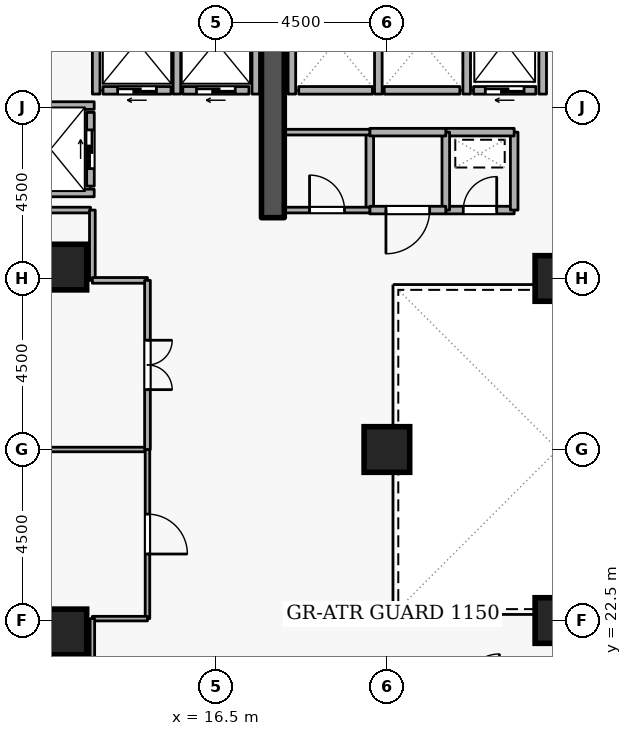
"""IFC4 building model, lengths in metres.
Left out: names, types, materials, properties, quantities, classifications, styles, units other than length and angle.
Written with IfcOpenShell. Run it as: python <this file> out.ifc"""

import sys

from ifc_helpers import new_model, si_unit, direction, frame, frame_2d, origin, origin_2d, place, context, subcontext, project, spatial, rectangle, extrude, element, fill, save


model = new_model("IFC4")
c1 = context("Model", 3, precision=1e-05, world=origin(), true_north=direction((0.0, 1.0)))
c2 = subcontext(c1, "Body", "Model", "MODEL_VIEW")
j1 = project(units=[si_unit("LENGTHUNIT", "METRE"), si_unit("PLANEANGLEUNIT", "RADIAN")], contexts=[c1])
p1 = place(None, origin())
s1 = spatial("IfcSite", under=j1, at=p1, CompositionType="ELEMENT")
p2 = place(p1, origin())
s2 = spatial("IfcBuilding", under=s1, at=p2, CompositionType="ELEMENT")
p3 = place(p2, frame((0.0, 0.0, 98.1)))
s3 = spatial("IfcBuildingStorey", under=s2, at=p3, CompositionType="ELEMENT", Elevation=98.1)
p4 = place(p3, frame((18.0, 33.1, 0.0), z_axis=(0.0, 0.0, 1.0), x_axis=(0.0, 1.0, 0.0)))
e1 = element("IfcWall", 1, at=p4, inside=s3, PredefinedType="SHEAR", context=c2, shape_type="SweptSolid", body=[
    extrude(rectangle(XDim=5.7, YDim=0.6, at=frame_2d((2.85, 0.0))), origin(), (0.0, 0.0, 1.0), 3.6),
])
for number, where, z_axis, x_axis in (
    (2, (12.5, 22.2, 0.0), (0.0, 0.0, 1.0), (1.0, 0.0, 0.0)),
    (3, (12.5, 31.8, 0.0), (0.0, 0.0, 1.0), (1.0, 0.0, 0.0)),
    (4, (25.5, 22.5, 0.0), (0.0, 0.0, 1.0), (1.0, 0.0, 0.0)),
    (5, (25.5, 31.5, 0.0), (0.0, 0.0, 1.0), (1.0, 0.0, 0.0)),
    (6, (21.0, 27.0, 0.0), (0.0, 0.0, 1.0), (1.0, 0.0, 0.0)),
):
    element("IfcColumn", number, at=place(p3, frame(where, z_axis=z_axis, x_axis=x_axis)), inside=s3, PredefinedType="COLUMN", context=c2, shape_type="SweptSolid", body=[
        extrude(rectangle(XDim=1.2, YDim=1.2, at=origin_2d()), origin(), (0.0, 0.0, 1.0), 3.6),
    ])
p5 = place(p3, frame((24.92, 36.45, 0.0), z_axis=(0.0, 0.0, 1.0), x_axis=(-1.0, 0.0, 0.0)))
e7 = element("IfcWall", 7, at=p5, inside=s3, PredefinedType="STANDARD", context=c2, shape_type="SweptSolid", body=[
    extrude(rectangle(XDim=1.64, YDim=0.2, at=frame_2d((0.82, 0.0))), origin(), (0.0, 0.0, 1.0), 3.3),
])
p6 = place(p5, frame((0.31, 0.0, 0.0)))
e8 = element("IfcOpeningElement", 8, at=p6, cuts=e7, PredefinedType="OPENING", context=c2, shape_type="SweptSolid", body=[
    extrude(rectangle(XDim=1.02, YDim=2.06, at=frame_2d((0.51, 1.03))), frame((0.0, 0.11, 0.0), z_axis=(0.0, -1.0, 0.0), x_axis=(1.0, 0.0, 0.0)), (0.0, 0.0, 1.0), 0.22),
])
p7 = place(p3, frame((22.92, 36.45, 0.0), z_axis=(0.0, 0.0, 1.0), x_axis=(-1.0, 0.0, 0.0)))
e9 = element("IfcWall", 9, at=p7, inside=s3, PredefinedType="STANDARD", context=c2, shape_type="SweptSolid", body=[
    extrude(rectangle(XDim=1.99, YDim=0.2, at=frame_2d((0.995, 0.0))), origin(), (0.0, 0.0, 1.0), 3.3),
])
p8 = place(p3, frame((20.62, 36.45, 0.0), z_axis=(0.0, 0.0, 1.0), x_axis=(-1.0, 0.0, 0.0)))
e10 = element("IfcWall", 10, at=p8, inside=s3, PredefinedType="STANDARD", context=c2, shape_type="SweptSolid", body=[
    extrude(rectangle(XDim=1.94, YDim=0.2, at=frame_2d((0.97, 0.0))), origin(), (0.0, 0.0, 1.0), 3.3),
])
p9 = place(p3, frame((17.37, 36.45, 0.0), z_axis=(0.0, 0.0, 1.0), x_axis=(-1.0, 0.0, 0.0)))
e11 = element("IfcWall", 11, at=p9, inside=s3, PredefinedType="STANDARD", context=c2, shape_type="SweptSolid", body=[
    extrude(rectangle(XDim=1.74, YDim=0.2, at=frame_2d((0.87, 0.0))), origin(), (0.0, 0.0, 1.0), 3.3),
])
p10 = place(p9, frame((0.36, 0.0, 0.0)))
e12 = element("IfcOpeningElement", 12, at=p10, cuts=e11, PredefinedType="OPENING", context=c2, shape_type="SweptSolid", body=[
    extrude(rectangle(XDim=1.02, YDim=2.06, at=frame_2d((0.51, 1.03))), frame((0.0, 0.11, 0.0), z_axis=(0.0, -1.0, 0.0), x_axis=(1.0, 0.0, 0.0)), (0.0, 0.0, 1.0), 0.22),
])
p11 = place(p3, frame((15.32, 36.45, 0.0), z_axis=(0.0, 0.0, 1.0), x_axis=(-1.0, 0.0, 0.0)))
e13 = element("IfcWall", 13, at=p11, inside=s3, PredefinedType="STANDARD", context=c2, shape_type="SweptSolid", body=[
    extrude(rectangle(XDim=1.79, YDim=0.2, at=frame_2d((0.895, 0.0))), origin(), (0.0, 0.0, 1.0), 3.3),
])
p12 = place(p11, frame((0.385, 0.0, 0.0)))
e14 = element("IfcOpeningElement", 14, at=p12, cuts=e13, PredefinedType="OPENING", context=c2, shape_type="SweptSolid", body=[
    extrude(rectangle(XDim=1.02, YDim=2.06, at=frame_2d((0.51, 1.03))), frame((0.0, 0.11, 0.0), z_axis=(0.0, -1.0, 0.0), x_axis=(1.0, 0.0, 0.0)), (0.0, 0.0, 1.0), 0.22),
])
p13 = place(p3, frame((13.2, 33.93, 0.0), z_axis=(0.0, 0.0, 1.0), x_axis=(0.0, 1.0, 0.0)))
e15 = element("IfcWall", 15, at=p13, inside=s3, PredefinedType="STANDARD", context=c2, shape_type="SweptSolid", body=[
    extrude(rectangle(XDim=1.94, YDim=0.2, at=frame_2d((0.97, 0.0))), origin(), (0.0, 0.0, 1.0), 3.3),
])
p14 = place(p13, frame((0.46, 0.0, 0.0)))
e16 = element("IfcOpeningElement", 16, at=p14, cuts=e15, PredefinedType="OPENING", context=c2, shape_type="SweptSolid", body=[
    extrude(rectangle(XDim=1.02, YDim=2.06, at=frame_2d((0.51, 1.03))), frame((0.0, 0.11, 0.0), z_axis=(0.0, -1.0, 0.0), x_axis=(1.0, 0.0, 0.0)), (0.0, 0.0, 1.0), 0.22),
])
for number, where, z_axis, x_axis in (
    (17, (25.1, 36.352, 0.0), (0.0, 0.0, 1.0), (0.0, 1.0, 0.0)),
    (18, (23.1, 36.352, 0.0), (0.0, 0.0, 1.0), (0.0, 1.0, 0.0)),
    (19, (20.775, 36.352, 0.0), (0.0, 0.0, 1.0), (0.0, 1.0, 0.0)),
    (20, (18.5, 36.352, 0.0), (0.0, 0.0, 1.0), (0.0, 1.0, 0.0)),
):
    element("IfcWall", number, at=place(p3, frame(where, z_axis=z_axis, x_axis=x_axis)), inside=s3, PredefinedType="STANDARD", context=c2, shape_type="SweptSolid", body=[
        extrude(rectangle(XDim=2.436, YDim=0.2, at=frame_2d((1.218, 0.0))), origin(), (0.0, 0.0, 1.0), 3.3),
    ])
p15 = place(p3, frame((17.55, 36.352, 0.0), z_axis=(0.0, 0.0, 1.0), x_axis=(0.0, 1.0, 0.0)))
e21 = element("IfcWall", 21, at=p15, inside=s3, PredefinedType="STANDARD", context=c2, shape_type="SweptSolid", body=[
    extrude(rectangle(XDim=2.636, YDim=0.2, at=frame_2d((1.318, 0.0))), origin(), (0.0, 0.0, 1.0), 2.505),
])
for number, where, z_axis, x_axis in (
    (22, (15.475, 36.352, 0.0), (0.0, 0.0, 1.0), (0.0, 1.0, 0.0)),
    (23, (13.35, 36.352, 0.0), (0.0, 0.0, 1.0), (0.0, 1.0, 0.0)),
):
    element("IfcWall", number, at=place(p3, frame(where, z_axis=z_axis, x_axis=x_axis)), inside=s3, PredefinedType="STANDARD", context=c2, shape_type="SweptSolid", body=[
        extrude(rectangle(XDim=2.636, YDim=0.2, at=frame_2d((1.318, 0.0))), origin(), (0.0, 0.0, 1.0), 3.3),
    ])
for number, where, z_axis, x_axis in (
    (24, (11.002, 36.05, 0.0), (0.0, 0.0, 1.0), (1.0, 0.0, 0.0)),
    (25, (11.002, 33.75, 0.0), (0.0, 0.0, 1.0), (1.0, 0.0, 0.0)),
):
    element("IfcWall", number, at=place(p3, frame(where, z_axis=z_axis, x_axis=x_axis)), inside=s3, PredefinedType="STANDARD", context=c2, shape_type="SweptSolid", body=[
        extrude(rectangle(XDim=2.296, YDim=0.2, at=frame_2d((1.148, 0.0))), origin(), (0.0, 0.0, 1.0), 3.3),
    ])
p16 = place(p3, frame((22.55, 33.3, 0.0), z_axis=(0.0, 0.0, 1.0), x_axis=(1.0, 0.0, 0.0)))
e26 = element("IfcWall", 26, at=p16, inside=s3, PredefinedType="STANDARD", context=c2, shape_type="SweptSolid", body=[
    extrude(rectangle(XDim=1.8, YDim=0.2, at=frame_2d((0.9, 0.0))), origin(), (0.0, 0.0, 1.0), 3.3),
])
p17 = place(p16, frame((0.46, 0.0, 0.0)))
e27 = element("IfcOpeningElement", 27, at=p17, cuts=e26, PredefinedType="OPENING", context=c2, shape_type="SweptSolid", body=[
    extrude(rectangle(XDim=0.88, YDim=2.04, at=frame_2d((0.44, 1.02))), frame((0.0, 0.11, 0.0), z_axis=(0.0, -1.0, 0.0), x_axis=(1.0, 0.0, 0.0)), (0.0, 0.0, 1.0), 0.22),
])
p18 = place(p3, frame((24.35, 33.3, 0.0), z_axis=(0.0, 0.0, 1.0), x_axis=(0.0, 1.0, 0.0)))
e28 = element("IfcWall", 28, at=p18, inside=s3, PredefinedType="STANDARD", context=c2, shape_type="SweptSolid", body=[
    extrude(rectangle(XDim=2.05, YDim=0.2, at=frame_2d((1.025, 0.0))), origin(), (0.0, 0.0, 1.0), 3.3),
])
p19 = place(p3, frame((24.35, 35.35, 0.0), z_axis=(0.0, 0.0, 1.0), x_axis=(-1.0, 0.0, 0.0)))
e29 = element("IfcWall", 29, at=p19, inside=s3, PredefinedType="STANDARD", context=c2, shape_type="SweptSolid", body=[
    extrude(rectangle(XDim=1.8, YDim=0.2, at=frame_2d((0.9, 0.0))), origin(), (0.0, 0.0, 1.0), 3.3),
])
for number, where, z_axis, x_axis in (
    (30, (22.55, 35.35, 0.0), (0.0, 0.0, 1.0), (0.0, -1.0, 0.0)),
    (31, (20.55, 33.3, 0.0), (0.0, 0.0, 1.0), (0.0, 1.0, 0.0)),
):
    element("IfcWall", number, at=place(p3, frame(where, z_axis=z_axis, x_axis=x_axis)), inside=s3, PredefinedType="STANDARD", context=c2, shape_type="SweptSolid", body=[
        extrude(rectangle(XDim=2.05, YDim=0.2, at=frame_2d((1.025, 0.0))), origin(), (0.0, 0.0, 1.0), 3.3),
    ])
p20 = place(p3, frame((20.55, 35.35, 0.0), z_axis=(0.0, 0.0, 1.0), x_axis=(1.0, 0.0, 0.0)))
e32 = element("IfcWall", 32, at=p20, inside=s3, PredefinedType="STANDARD", context=c2, shape_type="SweptSolid", body=[
    extrude(rectangle(XDim=2.0, YDim=0.2, at=frame_2d((1.0, 0.0))), origin(), (0.0, 0.0, 1.0), 3.3),
])
p21 = place(p3, frame((22.55, 33.3, 0.0), z_axis=(0.0, 0.0, 1.0), x_axis=(-1.0, 0.0, 0.0)))
e33 = element("IfcWall", 33, at=p21, inside=s3, PredefinedType="STANDARD", context=c2, shape_type="SweptSolid", body=[
    extrude(rectangle(XDim=2.0, YDim=0.2, at=frame_2d((1.0, 0.0))), origin(), (0.0, 0.0, 1.0), 3.3),
])
p22 = place(p21, frame((0.425, 0.0, 0.0)))
e34 = element("IfcOpeningElement", 34, at=p22, cuts=e33, PredefinedType="OPENING", context=c2, shape_type="SweptSolid", body=[
    extrude(rectangle(XDim=1.15, YDim=2.1, at=frame_2d((0.575, 1.05))), frame((0.0, 0.11, 0.0), z_axis=(0.0, -1.0, 0.0), x_axis=(1.0, 0.0, 0.0)), (0.0, 0.0, 1.0), 0.22),
])
p23 = place(p3, frame((18.3, 33.3, 0.0), z_axis=(0.0, 0.0, 1.0), x_axis=(1.0, 0.0, 0.0)))
e35 = element("IfcWall", 35, at=p23, inside=s3, PredefinedType="PARTITIONING", context=c2, shape_type="SweptSolid", body=[
    extrude(rectangle(XDim=2.25, YDim=0.15, at=frame_2d((1.125, 0.0))), origin(), (0.0, 0.0, 1.0), 3.3),
])
p24 = place(p23, frame((0.665, 0.0, 0.0)))
e36 = element("IfcOpeningElement", 36, at=p24, cuts=e35, PredefinedType="OPENING", context=c2, shape_type="SweptSolid", body=[
    extrude(rectangle(XDim=0.92, YDim=2.08, at=frame_2d((0.46, 1.04))), frame((0.0, 0.085, 0.0), z_axis=(0.0, -1.0, 0.0), x_axis=(1.0, 0.0, 0.0)), (0.0, 0.0, 1.0), 0.17),
])
p25 = place(p3, frame((20.55, 35.35, 0.0), z_axis=(0.0, 0.0, 1.0), x_axis=(-1.0, 0.0, 0.0)))
e37 = element("IfcWall", 37, at=p25, inside=s3, PredefinedType="PARTITIONING", context=c2, shape_type="SweptSolid", body=[
    extrude(rectangle(XDim=2.25, YDim=0.15, at=frame_2d((1.125, 0.0))), origin(), (0.0, 0.0, 1.0), 3.3),
])
p26 = place(p3, frame((1.58, 27.0, 0.0), z_axis=(0.0, 0.0, 1.0), x_axis=(1.0, 0.0, 0.0)))
e38 = element("IfcWall", 38, at=p26, inside=s3, PredefinedType="PARTITIONING", context=c2, shape_type="SweptSolid", body=[
    extrude(rectangle(XDim=13.12, YDim=0.12, at=frame_2d((6.56, 0.0))), origin(), (0.0, 0.0, 1.0), 2.838),
])
p27 = place(p3, frame((14.7, 27.0, 0.0), z_axis=(0.0, 0.0, 1.0), x_axis=(0.0, -1.0, 0.0)))
e39 = element("IfcWall", 39, at=p27, inside=s3, PredefinedType="PARTITIONING", context=c2, shape_type="SweptSolid", body=[
    extrude(rectangle(XDim=4.45, YDim=0.12, at=frame_2d((2.225, 0.0))), origin(), (0.0, 0.0, 1.0), 3.3),
])
p28 = place(p27, frame((1.7, 0.0, 0.0)))
e40 = element("IfcOpeningElement", 40, at=p28, cuts=e39, PredefinedType="OPENING", context=c2, shape_type="SweptSolid", body=[
    extrude(rectangle(XDim=1.05, YDim=2.1, at=frame_2d((0.525, 1.05))), frame((0.0, 0.07, 0.0), z_axis=(0.0, -1.0, 0.0), x_axis=(1.0, 0.0, 0.0)), (0.0, 0.0, 1.0), 0.14),
])
p29 = place(p3, frame((14.7, 22.55, 0.0), z_axis=(0.0, 0.0, 1.0), x_axis=(-1.0, 0.0, 0.0)))
e41 = element("IfcWall", 41, at=p29, inside=s3, PredefinedType="PARTITIONING", context=c2, shape_type="SweptSolid", body=[
    extrude(rectangle(XDim=1.45, YDim=0.12, at=frame_2d((0.725, 0.0))), origin(), (0.0, 0.0, 1.0), 3.3),
])
p30 = place(p3, frame((13.25, 22.55, 0.0), z_axis=(0.0, 0.0, 1.0), x_axis=(0.0, -1.0, 0.0)))
e42 = element("IfcWall", 42, at=p30, inside=s3, PredefinedType="PARTITIONING", context=c2, shape_type="SweptSolid", body=[
    extrude(rectangle(XDim=1.85, YDim=0.12, at=frame_2d((0.925, 0.0))), origin(), (0.0, 0.0, 1.0), 3.3),
])
p31 = place(p3, frame((10.9, 33.3, 0.0), z_axis=(0.0, 0.0, 1.0), x_axis=(1.0, 0.0, 0.0)))
e43 = element("IfcWall", 43, at=p31, inside=s3, PredefinedType="PARTITIONING", context=c2, shape_type="SweptSolid", body=[
    extrude(rectangle(XDim=2.3, YDim=0.15, at=frame_2d((1.15, 0.0))), origin(), (0.0, 0.0, 1.0), 3.3),
])
p32 = place(p3, frame((13.25, 33.3, 0.0), z_axis=(0.0, 0.0, 1.0), x_axis=(0.0, -1.0, 0.0)))
e44 = element("IfcWall", 44, at=p32, inside=s3, PredefinedType="PARTITIONING", context=c2, shape_type="SweptSolid", body=[
    extrude(rectangle(XDim=1.85, YDim=0.15, at=frame_2d((0.925, 0.0))), origin(), (0.0, 0.0, 1.0), 3.3),
])
p33 = place(p3, frame((13.25, 31.45, 0.0), z_axis=(0.0, 0.0, 1.0), x_axis=(1.0, 0.0, 0.0)))
e45 = element("IfcWall", 45, at=p33, inside=s3, PredefinedType="PARTITIONING", context=c2, shape_type="SweptSolid", body=[
    extrude(rectangle(XDim=1.45, YDim=0.15, at=frame_2d((0.725, 0.0))), origin(), (0.0, 0.0, 1.0), 3.3),
])
p34 = place(p3, frame((14.7, 31.45, 0.0), z_axis=(0.0, 0.0, 1.0), x_axis=(0.0, -1.0, 0.0)))
e46 = element("IfcWall", 46, at=p34, inside=s3, PredefinedType="PARTITIONING", context=c2, shape_type="SweptSolid", body=[
    extrude(rectangle(XDim=4.45, YDim=0.15, at=frame_2d((2.225, 0.0))), origin(), (0.0, 0.0, 1.0), 3.3),
])
p35 = place(p34, frame((1.575, 0.0, 0.0)))
e47 = element("IfcOpeningElement", 47, at=p35, cuts=e46, PredefinedType="OPENING", context=c2, shape_type="SweptSolid", body=[
    extrude(rectangle(XDim=1.3, YDim=2.12, at=frame_2d((0.65, 1.06))), frame((0.0, 0.085, 0.0), z_axis=(0.0, -1.0, 0.0), x_axis=(1.0, 0.0, 0.0)), (0.0, 0.0, 1.0), 0.17),
])
p36 = place(p6, origin())
e48 = element("IfcDoor", 48, at=p36, inside=s3, OperationType="SLIDING_TO_LEFT", PredefinedType="DOOR", context=c2, shape_type="SweptSolid", body=[
    extrude(rectangle(XDim=1.02, YDim=2.06, at=frame_2d((0.51, 1.03))), frame((0.0, 0.025, 0.0), z_axis=(0.0, -1.0, 0.0), x_axis=(1.0, 0.0, 0.0)), (0.0, 0.0, 1.0), 0.05),
])
fill(e8, e48)
p37 = place(p10, origin())
e49 = element("IfcDoor", 49, at=p37, inside=s3, OperationType="SLIDING_TO_LEFT", PredefinedType="DOOR", context=c2, shape_type="SweptSolid", body=[
    extrude(rectangle(XDim=1.02, YDim=2.06, at=frame_2d((0.51, 1.03))), frame((0.0, 0.025, 0.0), z_axis=(0.0, -1.0, 0.0), x_axis=(1.0, 0.0, 0.0)), (0.0, 0.0, 1.0), 0.05),
])
fill(e12, e49)
p38 = place(p12, origin())
e50 = element("IfcDoor", 50, at=p38, inside=s3, OperationType="SLIDING_TO_LEFT", PredefinedType="DOOR", context=c2, shape_type="SweptSolid", body=[
    extrude(rectangle(XDim=1.02, YDim=2.06, at=frame_2d((0.51, 1.03))), frame((0.0, 0.025, 0.0), z_axis=(0.0, -1.0, 0.0), x_axis=(1.0, 0.0, 0.0)), (0.0, 0.0, 1.0), 0.05),
])
fill(e14, e50)
p39 = place(p14, origin())
e51 = element("IfcDoor", 51, at=p39, inside=s3, OperationType="SLIDING_TO_LEFT", PredefinedType="DOOR", context=c2, shape_type="SweptSolid", body=[
    extrude(rectangle(XDim=1.02, YDim=2.06, at=frame_2d((0.51, 1.03))), frame((0.0, 0.025, 0.0), z_axis=(0.0, -1.0, 0.0), x_axis=(1.0, 0.0, 0.0)), (0.0, 0.0, 1.0), 0.05),
])
fill(e16, e51)
p40 = place(p17, origin())
e52 = element("IfcDoor", 52, at=p40, inside=s3, OperationType="SINGLE_SWING_RIGHT", PredefinedType="DOOR", context=c2, shape_type="SweptSolid", body=[
    extrude(rectangle(XDim=0.88, YDim=2.04, at=frame_2d((0.44, 1.02))), frame((0.0, 0.025, 0.0), z_axis=(0.0, -1.0, 0.0), x_axis=(1.0, 0.0, 0.0)), (0.0, 0.0, 1.0), 0.05),
])
fill(e27, e52)
p41 = place(p24, origin())
e53 = element("IfcDoor", 53, at=p41, inside=s3, OperationType="SINGLE_SWING_LEFT", PredefinedType="DOOR", context=c2, shape_type="SweptSolid", body=[
    extrude(rectangle(XDim=0.92, YDim=2.08, at=frame_2d((0.46, 1.04))), frame((0.0, 0.025, 0.0), z_axis=(0.0, -1.0, 0.0), x_axis=(1.0, 0.0, 0.0)), (0.0, 0.0, 1.0), 0.05),
])
fill(e36, e53)
p42 = place(p22, origin())
e54 = element("IfcDoor", 54, at=p42, inside=s3, OperationType="SINGLE_SWING_RIGHT", PredefinedType="DOOR", context=c2, shape_type="SweptSolid", body=[
    extrude(rectangle(XDim=1.15, YDim=2.1, at=frame_2d((0.575, 1.05))), frame((0.0, 0.025, 0.0), z_axis=(0.0, -1.0, 0.0), x_axis=(1.0, 0.0, 0.0)), (0.0, 0.0, 1.0), 0.05),
])
fill(e34, e54)
p43 = place(p28, origin())
e55 = element("IfcDoor", 55, at=p43, inside=s3, OperationType="SINGLE_SWING_RIGHT", PredefinedType="DOOR", context=c2, shape_type="SweptSolid", body=[
    extrude(rectangle(XDim=1.05, YDim=2.1, at=frame_2d((0.525, 1.05))), frame((0.0, 0.025, 0.0), z_axis=(0.0, -1.0, 0.0), x_axis=(1.0, 0.0, 0.0)), (0.0, 0.0, 1.0), 0.05),
])
fill(e40, e55)
p44 = place(p35, origin())
e56 = element("IfcDoor", 56, at=p44, inside=s3, OperationType="DOUBLE_DOOR_SINGLE_SWING", PredefinedType="DOOR", context=c2, shape_type="SweptSolid", body=[
    extrude(rectangle(XDim=1.3, YDim=2.12, at=frame_2d((0.65, 1.06))), frame((0.0, 0.025, 0.0), z_axis=(0.0, -1.0, 0.0), x_axis=(1.0, 0.0, 0.0)), (0.0, 0.0, 1.0), 0.05),
])
fill(e47, e56)
save(model, sys.argv[1])
